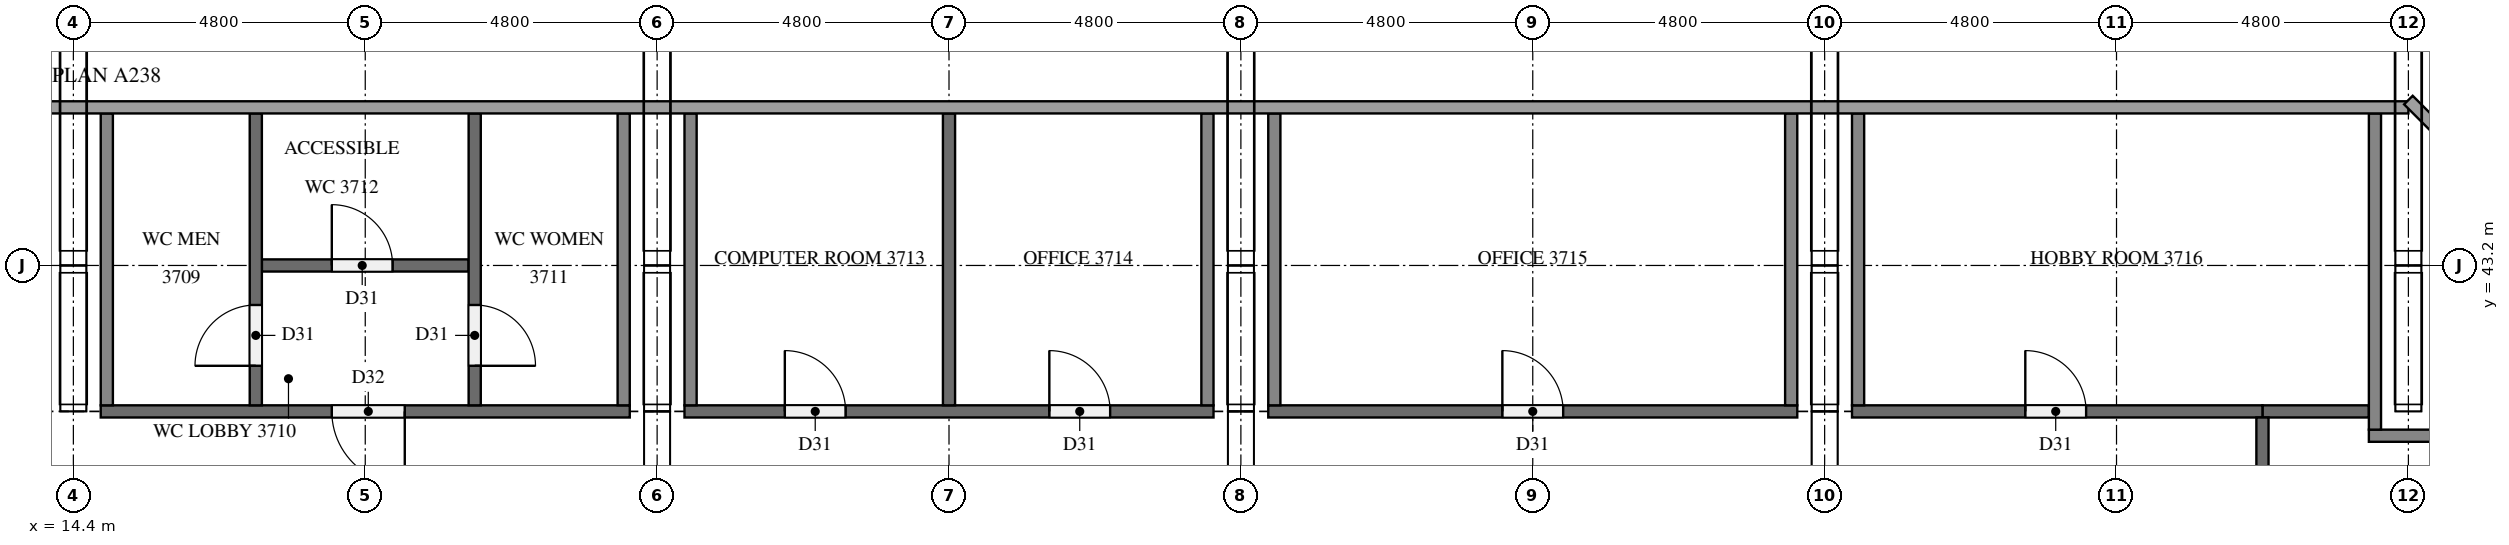
"""IFC4 building model, lengths in metres.
Left out: names, types, materials, properties, quantities, classifications, styles, units other than length and angle.
Written with IfcOpenShell. Run it as: python <this file> out.ifc"""

import sys

from ifc_helpers import new_model, si_unit, direction, frame, frame_2d, origin, place, context, subcontext, project, spatial, rectangle, extrude, element, fill, save


model = new_model("IFC4")
c1 = context("Model", 3, precision=1e-05, world=origin(), true_north=direction((0.0, 1.0)))
c2 = subcontext(c1, "Body", "Model", "MODEL_VIEW")
j1 = project(units=[si_unit("LENGTHUNIT", "METRE"), si_unit("PLANEANGLEUNIT", "RADIAN")], contexts=[c1])
p1 = place(None, origin())
s1 = spatial("IfcSite", under=j1, at=p1, CompositionType="ELEMENT")
p2 = place(p1, origin())
s2 = spatial("IfcBuilding", under=s1, at=p2, CompositionType="ELEMENT")
p3 = place(p2, frame((0.0, 0.0, 143.6)))
s3 = spatial("IfcBuildingStorey", under=s2, at=p3, CompositionType="ELEMENT", Elevation=143.6)
p4 = place(p3, frame((52.15, 40.4, 0.0), z_axis=(0.0, 0.0, 1.0), x_axis=(1.0, 0.0, 0.0)))
e1 = element("IfcWall", 1, at=p4, inside=s3, PredefinedType="PARTITIONING", context=c2, shape_type="SweptSolid", body=[
    extrude(rectangle(XDim=1.3, YDim=0.2, at=frame_2d((0.65, 0.0))), origin(), (0.0, 0.0, 1.0), 5.1),
])
p5 = place(p3, frame((50.4, 40.8, 0.0), z_axis=(0.0, 0.0, 1.0), x_axis=(1.0, 0.0, 0.0)))
e2 = element("IfcWall", 2, at=p5, inside=s3, PredefinedType="PARTITIONING", context=c2, shape_type="SweptSolid", body=[
    extrude(rectangle(XDim=1.75, YDim=0.2, at=frame_2d((0.875, 0.0))), origin(), (0.0, 0.0, 1.0), 5.1),
])
p6 = place(p3, frame((23.55, 40.8, 0.0), z_axis=(0.0, 0.0, 1.0), x_axis=(-1.0, 0.0, 0.0)))
e3 = element("IfcWall", 3, at=p6, inside=s3, PredefinedType="PARTITIONING", context=c2, shape_type="SweptSolid", body=[
    extrude(rectangle(XDim=8.7, YDim=0.2, at=frame_2d((4.35, 0.0))), origin(), (0.0, 0.0, 1.0), 5.1),
])
p7 = place(p6, frame((3.7, 0.0, 0.0)))
e4 = element("IfcOpeningElement", 4, at=p7, cuts=e3, PredefinedType="OPENING", context=c2, shape_type="SweptSolid", body=[
    extrude(rectangle(XDim=1.2, YDim=2.1, at=frame_2d((0.6, 1.05))), frame((0.0, 0.11, 0.0), z_axis=(0.0, -1.0, 0.0), x_axis=(1.0, 0.0, 0.0)), (0.0, 0.0, 1.0), 0.22),
])
p8 = place(p3, frame((24.45, 40.8, 0.0), z_axis=(0.0, 0.0, 1.0), x_axis=(1.0, 0.0, 0.0)))
e5 = element("IfcWall", 5, at=p8, inside=s3, PredefinedType="PARTITIONING", context=c2, shape_type="SweptSolid", body=[
    extrude(rectangle(XDim=8.7, YDim=0.2, at=frame_2d((4.35, 0.0))), origin(), (0.0, 0.0, 1.0), 5.1),
])
p9 = place(p8, frame((1.65, 0.0, 0.0)))
e6 = element("IfcOpeningElement", 6, at=p9, cuts=e5, PredefinedType="OPENING", context=c2, shape_type="SweptSolid", body=[
    extrude(rectangle(XDim=1.0, YDim=2.1, at=frame_2d((0.5, 1.05))), frame((0.0, 0.11, 0.0), z_axis=(0.0, -1.0, 0.0), x_axis=(1.0, 0.0, 0.0)), (0.0, 0.0, 1.0), 0.22),
])
p10 = place(p8, frame((6.0, 0.0, 0.0)))
e7 = element("IfcOpeningElement", 7, at=p10, cuts=e5, PredefinedType="OPENING", context=c2, shape_type="SweptSolid", body=[
    extrude(rectangle(XDim=1.0, YDim=2.1, at=frame_2d((0.5, 1.05))), frame((0.0, 0.11, 0.0), z_axis=(0.0, -1.0, 0.0), x_axis=(1.0, 0.0, 0.0)), (0.0, 0.0, 1.0), 0.22),
])
p11 = place(p3, frame((34.05, 40.8, 0.0), z_axis=(0.0, 0.0, 1.0), x_axis=(1.0, 0.0, 0.0)))
e8 = element("IfcWall", 8, at=p11, inside=s3, PredefinedType="PARTITIONING", context=c2, shape_type="SweptSolid", body=[
    extrude(rectangle(XDim=8.7, YDim=0.2, at=frame_2d((4.35, 0.0))), origin(), (0.0, 0.0, 1.0), 5.1),
])
p12 = place(p11, frame((3.85, 0.0, 0.0)))
e9 = element("IfcOpeningElement", 9, at=p12, cuts=e8, PredefinedType="OPENING", context=c2, shape_type="SweptSolid", body=[
    extrude(rectangle(XDim=1.0, YDim=2.1, at=frame_2d((0.5, 1.05))), frame((0.0, 0.11, 0.0), z_axis=(0.0, -1.0, 0.0), x_axis=(1.0, 0.0, 0.0)), (0.0, 0.0, 1.0), 0.22),
])
p13 = place(p3, frame((43.65, 40.8, 0.0), z_axis=(0.0, 0.0, 1.0), x_axis=(1.0, 0.0, 0.0)))
e10 = element("IfcWall", 10, at=p13, inside=s3, PredefinedType="PARTITIONING", context=c2, shape_type="SweptSolid", body=[
    extrude(rectangle(XDim=6.75, YDim=0.2, at=frame_2d((3.375, 0.0))), origin(), (0.0, 0.0, 1.0), 5.1),
])
p14 = place(p13, frame((2.85, 0.0, 0.0)))
e11 = element("IfcOpeningElement", 11, at=p14, cuts=e10, PredefinedType="OPENING", context=c2, shape_type="SweptSolid", body=[
    extrude(rectangle(XDim=1.0, YDim=2.1, at=frame_2d((0.5, 1.05))), frame((0.0, 0.11, 0.0), z_axis=(0.0, -1.0, 0.0), x_axis=(1.0, 0.0, 0.0)), (0.0, 0.0, 1.0), 0.22),
])
p15 = place(p3, frame((17.5, 43.2, 0.0), z_axis=(0.0, 0.0, 1.0), x_axis=(1.0, 0.0, 0.0)))
e12 = element("IfcWall", 12, at=p15, inside=s3, PredefinedType="PARTITIONING", context=c2, shape_type="SweptSolid", body=[
    extrude(rectangle(XDim=3.4, YDim=0.2, at=frame_2d((1.7, 0.0))), origin(), (0.0, 0.0, 1.0), 5.1),
])
p16 = place(p15, frame((1.15, 0.0, 0.0)))
e13 = element("IfcOpeningElement", 13, at=p16, cuts=e12, PredefinedType="OPENING", context=c2, shape_type="SweptSolid", body=[
    extrude(rectangle(XDim=1.0, YDim=2.1, at=frame_2d((0.5, 1.05))), frame((0.0, 0.11, 0.0), z_axis=(0.0, -1.0, 0.0), x_axis=(1.0, 0.0, 0.0)), (0.0, 0.0, 1.0), 0.22),
])
p17 = place(p3, frame((14.95, 40.9, 0.0), z_axis=(0.0, 0.0, 1.0), x_axis=(0.0, 1.0, 0.0)))
e14 = element("IfcWall", 14, at=p17, inside=s3, PredefinedType="PARTITIONING", context=c2, shape_type="SweptSolid", body=[
    extrude(rectangle(XDim=4.8, YDim=0.2, at=frame_2d((2.4, 0.0))), origin(), (0.0, 0.0, 1.0), 5.1),
])
p18 = place(p3, frame((17.4, 40.9, 0.0), z_axis=(0.0, 0.0, 1.0), x_axis=(0.0, 1.0, 0.0)))
e15 = element("IfcWall", 15, at=p18, inside=s3, PredefinedType="PARTITIONING", context=c2, shape_type="SweptSolid", body=[
    extrude(rectangle(XDim=4.8, YDim=0.2, at=frame_2d((2.4, 0.0))), origin(), (0.0, 0.0, 1.0), 5.1),
])
p19 = place(p18, frame((0.65, 0.0, 0.0)))
e16 = element("IfcOpeningElement", 16, at=p19, cuts=e15, PredefinedType="OPENING", context=c2, shape_type="SweptSolid", body=[
    extrude(rectangle(XDim=1.0, YDim=2.1, at=frame_2d((0.5, 1.05))), frame((0.0, 0.11, 0.0), z_axis=(0.0, -1.0, 0.0), x_axis=(1.0, 0.0, 0.0)), (0.0, 0.0, 1.0), 0.22),
])
p20 = place(p3, frame((21.0, 45.7, 0.0), z_axis=(0.0, 0.0, 1.0), x_axis=(0.0, -1.0, 0.0)))
e17 = element("IfcWall", 17, at=p20, inside=s3, PredefinedType="PARTITIONING", context=c2, shape_type="SweptSolid", body=[
    extrude(rectangle(XDim=4.8, YDim=0.2, at=frame_2d((2.4, 0.0))), origin(), (0.0, 0.0, 1.0), 5.1),
])
p21 = place(p20, frame((3.15, 0.0, 0.0)))
e18 = element("IfcOpeningElement", 18, at=p21, cuts=e17, PredefinedType="OPENING", context=c2, shape_type="SweptSolid", body=[
    extrude(rectangle(XDim=1.0, YDim=2.1, at=frame_2d((0.5, 1.05))), frame((0.0, 0.11, 0.0), z_axis=(0.0, -1.0, 0.0), x_axis=(1.0, 0.0, 0.0)), (0.0, 0.0, 1.0), 0.22),
])
for number, where, z_axis, x_axis in (
    (19, (23.45, 40.9, 0.0), (0.0, 0.0, 1.0), (0.0, 1.0, 0.0)),
    (20, (24.55, 40.9, 0.0), (0.0, 0.0, 1.0), (0.0, 1.0, 0.0)),
    (21, (28.8, 40.9, 0.0), (0.0, 0.0, 1.0), (0.0, 1.0, 0.0)),
    (22, (33.05, 40.9, 0.0), (0.0, 0.0, 1.0), (0.0, 1.0, 0.0)),
    (23, (34.15, 40.9, 0.0), (0.0, 0.0, 1.0), (0.0, 1.0, 0.0)),
    (24, (42.65, 40.9, 0.0), (0.0, 0.0, 1.0), (0.0, 1.0, 0.0)),
    (25, (43.75, 40.9, 0.0), (0.0, 0.0, 1.0), (0.0, 1.0, 0.0)),
):
    element("IfcWall", number, at=place(p3, frame(where, z_axis=z_axis, x_axis=x_axis)), inside=s3, PredefinedType="PARTITIONING", context=c2, shape_type="SweptSolid", body=[
        extrude(rectangle(XDim=4.8, YDim=0.2, at=frame_2d((2.4, 0.0))), origin(), (0.0, 0.0, 1.0), 5.1),
    ])
p22 = place(p3, frame((50.4, 40.7, 0.0), z_axis=(0.0, 0.0, 1.0), x_axis=(0.0, -1.0, 0.0)))
e26 = element("IfcWall", 26, at=p22, inside=s3, PredefinedType="PARTITIONING", context=c2, shape_type="SweptSolid", body=[
    extrude(rectangle(XDim=28.6, YDim=0.2, at=frame_2d((14.3, 0.0))), origin(), (0.0, 0.0, 1.0), 5.1),
])
p23 = place(p22, frame((24.55, 0.0, 0.0)))
e27 = element("IfcOpeningElement", 27, at=p23, cuts=e26, PredefinedType="OPENING", context=c2, shape_type="SweptSolid", body=[
    extrude(rectangle(XDim=1.0, YDim=2.1, at=frame_2d((0.5, 1.05))), frame((0.0, 0.11, 0.0), z_axis=(0.0, -1.0, 0.0), x_axis=(1.0, 0.0, 0.0)), (0.0, 0.0, 1.0), 0.22),
])
p24 = place(p22, frame((18.65, 0.0, 0.0)))
e28 = element("IfcOpeningElement", 28, at=p24, cuts=e26, PredefinedType="OPENING", context=c2, shape_type="SweptSolid", body=[
    extrude(rectangle(XDim=1.0, YDim=2.1, at=frame_2d((0.5, 1.05))), frame((0.0, 0.11, 0.0), z_axis=(0.0, -1.0, 0.0), x_axis=(1.0, 0.0, 0.0)), (0.0, 0.0, 1.0), 0.22),
])
p25 = place(p22, frame((13.85, 0.0, 0.0)))
e29 = element("IfcOpeningElement", 29, at=p25, cuts=e26, PredefinedType="OPENING", context=c2, shape_type="SweptSolid", body=[
    extrude(rectangle(XDim=1.0, YDim=2.1, at=frame_2d((0.5, 1.05))), frame((0.0, 0.11, 0.0), z_axis=(0.0, -1.0, 0.0), x_axis=(1.0, 0.0, 0.0)), (0.0, 0.0, 1.0), 0.22),
])
p26 = place(p22, frame((9.05, 0.0, 0.0)))
e30 = element("IfcOpeningElement", 30, at=p26, cuts=e26, PredefinedType="OPENING", context=c2, shape_type="SweptSolid", body=[
    extrude(rectangle(XDim=1.0, YDim=2.1, at=frame_2d((0.5, 1.05))), frame((0.0, 0.11, 0.0), z_axis=(0.0, -1.0, 0.0), x_axis=(1.0, 0.0, 0.0)), (0.0, 0.0, 1.0), 0.22),
])
p27 = place(p22, frame((3.05, 0.0, 0.0)))
e31 = element("IfcOpeningElement", 31, at=p27, cuts=e26, PredefinedType="OPENING", context=c2, shape_type="SweptSolid", body=[
    extrude(rectangle(XDim=1.0, YDim=2.1, at=frame_2d((0.5, 1.05))), frame((0.0, 0.11, 0.0), z_axis=(0.0, -1.0, 0.0), x_axis=(1.0, 0.0, 0.0)), (0.0, 0.0, 1.0), 0.22),
])
p28 = place(p3, frame((52.25, 40.5, 0.0), z_axis=(0.0, 0.0, 1.0), x_axis=(0.0, 1.0, 0.0)))
e32 = element("IfcWall", 32, at=p28, inside=s3, PredefinedType="PARTITIONING", context=c2, shape_type="SweptSolid", body=[
    extrude(rectangle(XDim=5.2, YDim=0.2, at=frame_2d((2.6, 0.0))), origin(), (0.0, 0.0, 1.0), 5.1),
])
p29 = place(p7, origin())
e33 = element("IfcDoor", 33, at=p29, inside=s3, OperationType="SINGLE_SWING_LEFT", PredefinedType="DOOR", context=c2, shape_type="SweptSolid", body=[
    extrude(rectangle(XDim=1.2, YDim=2.1, at=frame_2d((0.6, 1.05))), frame((0.0, 0.025, 0.0), z_axis=(0.0, -1.0, 0.0), x_axis=(1.0, 0.0, 0.0)), (0.0, 0.0, 1.0), 0.05),
])
fill(e4, e33)
p30 = place(p19, origin())
e34 = element("IfcDoor", 34, at=p30, inside=s3, OperationType="SINGLE_SWING_LEFT", PredefinedType="DOOR", context=c2, shape_type="SweptSolid", body=[
    extrude(rectangle(XDim=1.0, YDim=2.1, at=frame_2d((0.5, 1.05))), frame((0.0, 0.025, 0.0), z_axis=(0.0, -1.0, 0.0), x_axis=(1.0, 0.0, 0.0)), (0.0, 0.0, 1.0), 0.05),
])
fill(e16, e34)
p31 = place(p21, origin())
e35 = element("IfcDoor", 35, at=p31, inside=s3, OperationType="SINGLE_SWING_RIGHT", PredefinedType="DOOR", context=c2, shape_type="SweptSolid", body=[
    extrude(rectangle(XDim=1.0, YDim=2.1, at=frame_2d((0.5, 1.05))), frame((0.0, 0.025, 0.0), z_axis=(0.0, -1.0, 0.0), x_axis=(1.0, 0.0, 0.0)), (0.0, 0.0, 1.0), 0.05),
])
fill(e18, e35)
p32 = place(p16, origin())
e36 = element("IfcDoor", 36, at=p32, inside=s3, OperationType="SINGLE_SWING_LEFT", PredefinedType="DOOR", context=c2, shape_type="SweptSolid", body=[
    extrude(rectangle(XDim=1.0, YDim=2.1, at=frame_2d((0.5, 1.05))), frame((0.0, 0.025, 0.0), z_axis=(0.0, -1.0, 0.0), x_axis=(1.0, 0.0, 0.0)), (0.0, 0.0, 1.0), 0.05),
])
fill(e13, e36)
p33 = place(p9, origin())
e37 = element("IfcDoor", 37, at=p33, inside=s3, OperationType="SINGLE_SWING_LEFT", PredefinedType="DOOR", context=c2, shape_type="SweptSolid", body=[
    extrude(rectangle(XDim=1.0, YDim=2.1, at=frame_2d((0.5, 1.05))), frame((0.0, 0.025, 0.0), z_axis=(0.0, -1.0, 0.0), x_axis=(1.0, 0.0, 0.0)), (0.0, 0.0, 1.0), 0.05),
])
fill(e6, e37)
p34 = place(p10, origin())
e38 = element("IfcDoor", 38, at=p34, inside=s3, OperationType="SINGLE_SWING_LEFT", PredefinedType="DOOR", context=c2, shape_type="SweptSolid", body=[
    extrude(rectangle(XDim=1.0, YDim=2.1, at=frame_2d((0.5, 1.05))), frame((0.0, 0.025, 0.0), z_axis=(0.0, -1.0, 0.0), x_axis=(1.0, 0.0, 0.0)), (0.0, 0.0, 1.0), 0.05),
])
fill(e7, e38)
p35 = place(p12, origin())
e39 = element("IfcDoor", 39, at=p35, inside=s3, OperationType="SINGLE_SWING_LEFT", PredefinedType="DOOR", context=c2, shape_type="SweptSolid", body=[
    extrude(rectangle(XDim=1.0, YDim=2.1, at=frame_2d((0.5, 1.05))), frame((0.0, 0.025, 0.0), z_axis=(0.0, -1.0, 0.0), x_axis=(1.0, 0.0, 0.0)), (0.0, 0.0, 1.0), 0.05),
])
fill(e9, e39)
p36 = place(p14, origin())
e40 = element("IfcDoor", 40, at=p36, inside=s3, OperationType="SINGLE_SWING_LEFT", PredefinedType="DOOR", context=c2, shape_type="SweptSolid", body=[
    extrude(rectangle(XDim=1.0, YDim=2.1, at=frame_2d((0.5, 1.05))), frame((0.0, 0.025, 0.0), z_axis=(0.0, -1.0, 0.0), x_axis=(1.0, 0.0, 0.0)), (0.0, 0.0, 1.0), 0.05),
])
fill(e11, e40)
save(model, sys.argv[1])
